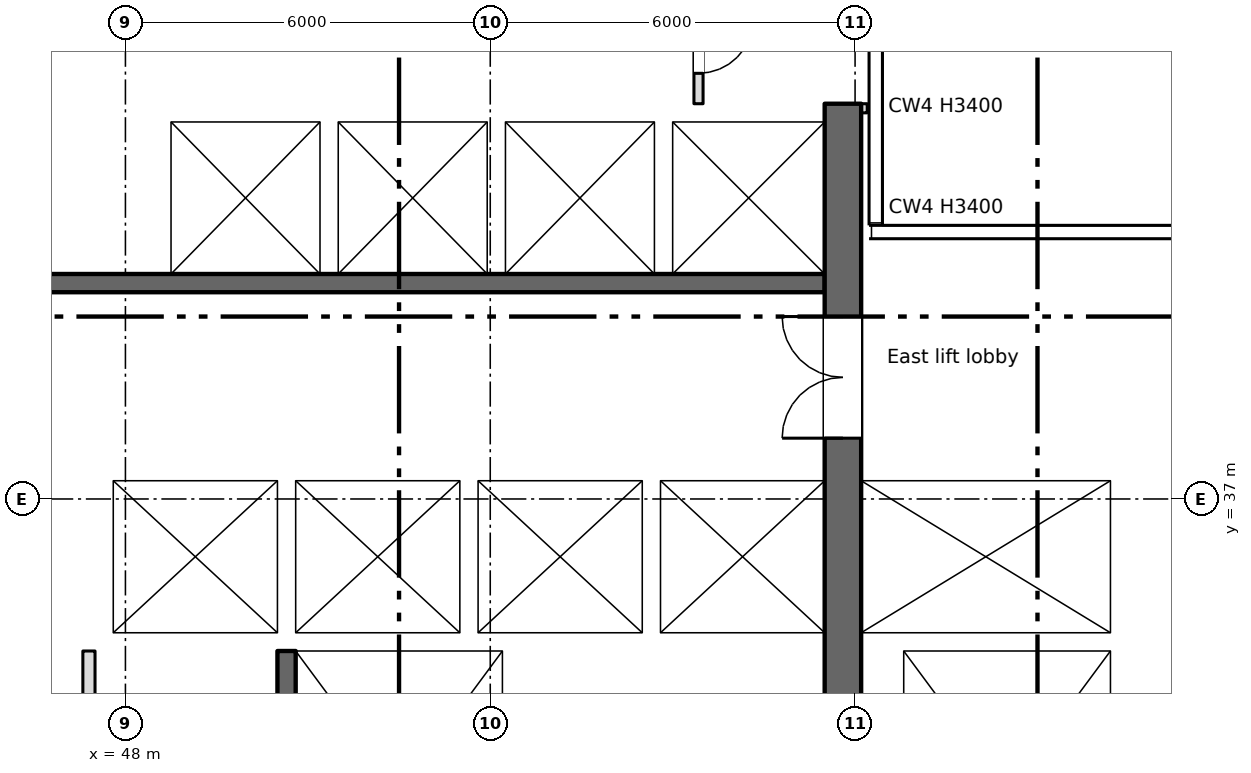
"""IFC4 building model, lengths in metres.
Left out: names, types, materials, properties, quantities, classifications, styles, units other than length and angle.
Written with IfcOpenShell. Run it as: python <this file> out.ifc"""

import sys

from ifc_helpers import new_model, si_unit, direction, frame, frame_2d, origin, place, context, subcontext, project, spatial, rectangle, extrude, element, fill, save


model = new_model("IFC4")
c1 = context("Model", 3, precision=1e-05, world=origin(), true_north=direction((0.0, 1.0)))
c2 = subcontext(c1, "Body", "Model", "MODEL_VIEW")
j1 = project(units=[si_unit("LENGTHUNIT", "METRE"), si_unit("PLANEANGLEUNIT", "RADIAN")], contexts=[c1])
p1 = place(None, origin())
s1 = spatial("IfcSite", under=j1, at=p1, CompositionType="ELEMENT")
p2 = place(p1, origin())
s2 = spatial("IfcBuilding", under=s1, at=p2, CompositionType="ELEMENT")
p3 = place(p2, frame((0.0, 0.0, 250.75)))
s3 = spatial("IfcBuildingStorey", under=s2, at=p3, CompositionType="ELEMENT", Elevation=250.75)
p4 = place(p3, frame((64.35, 34.8, 0.0), z_axis=(0.0, 0.0, 1.0), x_axis=(0.0, 1.0, 0.0)))
e1 = element("IfcWall", 1, at=p4, inside=s3, PredefinedType="SHEAR", context=c2, shape_type="SweptSolid", body=[
    extrude(rectangle(XDim=6.45, YDim=0.3, at=frame_2d((3.225, 0.0))), origin(), (0.0, 0.0, 1.0), 3.4),
])
p5 = place(p3, frame((59.8, 28.4, 0.0), z_axis=(0.0, 0.0, 1.0), x_axis=(0.0, 1.0, 0.0)))
e2 = element("IfcWall", 2, at=p5, inside=s3, PredefinedType="SHEAR", context=c2, shape_type="SweptSolid", body=[
    extrude(rectangle(XDim=15.1, YDim=0.6, at=frame_2d((7.55, 0.0))), origin(), (0.0, 0.0, 1.0), 3.4),
])
p6 = place(p5, frame((9.6, 0.0, 0.0)))
e3 = element("IfcOpeningElement", 3, at=p6, cuts=e2, PredefinedType="OPENING", context=c2, shape_type="SweptSolid", body=[
    extrude(rectangle(XDim=2.0, YDim=2.1, at=frame_2d((1.0, 1.05))), frame((0.0, 0.31, 0.0), z_axis=(0.0, -1.0, 0.0), x_axis=(1.0, 0.0, 0.0)), (0.0, 0.0, 1.0), 0.62),
])
p7 = place(p3, frame((50.65, 34.5, 0.0), z_axis=(0.0, 0.0, 1.0), x_axis=(0.0, -1.0, 0.0)))
e4 = element("IfcWall", 4, at=p7, inside=s3, PredefinedType="SHEAR", context=c2, shape_type="SweptSolid", body=[
    extrude(rectangle(XDim=6.1, YDim=0.3, at=frame_2d((3.05, 0.0))), origin(), (0.0, 0.0, 1.0), 3.4),
])
p8 = place(p7, frame((4.95, 0.0, 0.0)))
e5 = element("IfcOpeningElement", 5, at=p8, cuts=e4, PredefinedType="OPENING", context=c2, shape_type="SweptSolid", body=[
    extrude(rectangle(XDim=1.1, YDim=2.1, at=frame_2d((0.55, 1.05))), frame((0.0, 0.16, 0.0), z_axis=(0.0, -1.0, 0.0), x_axis=(1.0, 0.0, 0.0)), (0.0, 0.0, 1.0), 0.32),
])
p9 = place(p3, frame((54.35, 28.4, 0.0), z_axis=(0.0, 0.0, 1.0), x_axis=(0.0, 1.0, 0.0)))
e6 = element("IfcWall", 6, at=p9, inside=s3, PredefinedType="SHEAR", context=c2, shape_type="SweptSolid", body=[
    extrude(rectangle(XDim=6.1, YDim=0.3, at=frame_2d((3.05, 0.0))), origin(), (0.0, 0.0, 1.0), 3.4),
])
p10 = place(p3, frame((60.45, 28.4, 0.0), z_axis=(0.0, 0.0, 1.0), x_axis=(0.0, 1.0, 0.0)))
e7 = element("IfcWall", 7, at=p10, inside=s3, PredefinedType="SHEAR", context=c2, shape_type="SweptSolid", body=[
    extrude(rectangle(XDim=6.1, YDim=0.7, at=frame_2d((3.05, 0.0))), origin(), (0.0, 0.0, 1.0), 3.4),
])
p11 = place(p3, frame((64.35, 28.4, 0.0), z_axis=(0.0, 0.0, 1.0), x_axis=(0.0, 1.0, 0.0)))
e8 = element("IfcWall", 8, at=p11, inside=s3, PredefinedType="SHEAR", context=c2, shape_type="SweptSolid", body=[
    extrude(rectangle(XDim=6.1, YDim=0.3, at=frame_2d((3.05, 0.0))), origin(), (0.0, 0.0, 1.0), 3.4),
])
p12 = place(p3, frame((47.3, 34.65, 0.0), z_axis=(0.0, 0.0, 1.0), x_axis=(1.0, 0.0, 0.0)))
e9 = element("IfcWall", 9, at=p12, inside=s3, PredefinedType="SHEAR", context=c2, shape_type="SweptSolid", body=[
    extrude(rectangle(XDim=12.2, YDim=0.3, at=frame_2d((6.1, 0.0))), origin(), (0.0, 0.0, 1.0), 3.4),
])
p13 = place(p12, frame((1.3, 0.0, 0.0)))
e10 = element("IfcOpeningElement", 10, at=p13, cuts=e9, PredefinedType="OPENING", context=c2, shape_type="SweptSolid", body=[
    extrude(rectangle(XDim=1.1, YDim=2.1, at=frame_2d((0.55, 1.05))), frame((0.0, 0.16, 0.0), z_axis=(0.0, -1.0, 0.0), x_axis=(1.0, 0.0, 0.0)), (0.0, 0.0, 1.0), 0.32),
])
p14 = place(p3, frame((60.1, 34.65, 0.0), z_axis=(0.0, 0.0, 1.0), x_axis=(1.0, 0.0, 0.0)))
e11 = element("IfcWall", 11, at=p14, inside=s3, PredefinedType="SHEAR", context=c2, shape_type="SweptSolid", body=[
    extrude(rectangle(XDim=4.4, YDim=0.3, at=frame_2d((2.2, 0.0))), origin(), (0.0, 0.0, 1.0), 3.4),
])
p15 = place(p3, frame((47.3, 37.45, 0.0), z_axis=(0.0, 0.0, 1.0), x_axis=(1.0, 0.0, 0.0)))
e12 = element("IfcWall", 12, at=p15, inside=s3, PredefinedType="SHEAR", context=c2, shape_type="SweptSolid", body=[
    extrude(rectangle(XDim=12.2, YDim=0.3, at=frame_2d((6.1, 0.0))), origin(), (0.0, 0.0, 1.0), 3.4),
])
p16 = place(p15, frame((4.3, 0.0, 0.0)))
e13 = element("IfcOpeningElement", 13, at=p16, cuts=e12, PredefinedType="OPENING", context=c2, shape_type="SweptSolid", body=[
    extrude(rectangle(XDim=1.1, YDim=2.1, at=frame_2d((0.55, 1.05))), frame((0.0, 0.16, 0.0), z_axis=(0.0, -1.0, 0.0), x_axis=(1.0, 0.0, 0.0)), (0.0, 0.0, 1.0), 0.32),
])
p17 = place(p15, frame((7.3, 0.0, 0.0)))
e14 = element("IfcOpeningElement", 14, at=p17, cuts=e12, PredefinedType="OPENING", context=c2, shape_type="SweptSolid", body=[
    extrude(rectangle(XDim=1.1, YDim=2.1, at=frame_2d((0.55, 1.05))), frame((0.0, 0.16, 0.0), z_axis=(0.0, -1.0, 0.0), x_axis=(1.0, 0.0, 0.0)), (0.0, 0.0, 1.0), 0.32),
])
p18 = place(p15, frame((10.3, 0.0, 0.0)))
e15 = element("IfcOpeningElement", 15, at=p18, cuts=e12, PredefinedType="OPENING", context=c2, shape_type="SweptSolid", body=[
    extrude(rectangle(XDim=1.1, YDim=2.1, at=frame_2d((0.55, 1.05))), frame((0.0, 0.16, 0.0), z_axis=(0.0, -1.0, 0.0), x_axis=(1.0, 0.0, 0.0)), (0.0, 0.0, 1.0), 0.32),
])
p19 = place(p3, frame((60.1, 37.45, 0.0), z_axis=(0.0, 0.0, 1.0), x_axis=(1.0, 0.0, 0.0)))
e16 = element("IfcWall", 16, at=p19, inside=s3, PredefinedType="SHEAR", context=c2, shape_type="SweptSolid", body=[
    extrude(rectangle(XDim=4.1, YDim=0.3, at=frame_2d((2.05, 0.0))), origin(), (0.0, 0.0, 1.0), 3.4),
])
p20 = place(p19, frame((1.5, 0.0, 0.0)))
e17 = element("IfcOpeningElement", 17, at=p20, cuts=e16, PredefinedType="OPENING", context=c2, shape_type="SweptSolid", body=[
    extrude(rectangle(XDim=1.1, YDim=2.1, at=frame_2d((0.55, 1.05))), frame((0.0, 0.16, 0.0), z_axis=(0.0, -1.0, 0.0), x_axis=(1.0, 0.0, 0.0)), (0.0, 0.0, 1.0), 0.32),
])
p21 = place(p3, frame((47.55, 34.8, 0.0), z_axis=(0.0, 0.0, 1.0), x_axis=(0.0, 1.0, 0.0)))
e18 = element("IfcWall", 18, at=p21, inside=s3, PredefinedType="SHEAR", context=c2, shape_type="SweptSolid", body=[
    extrude(rectangle(XDim=2.5, YDim=0.5, at=frame_2d((1.25, 0.0))), origin(), (0.0, 0.0, 1.0), 3.4),
])
p22 = place(p3, frame((50.65, 34.8, 0.0), z_axis=(0.0, 0.0, 1.0), x_axis=(0.0, 1.0, 0.0)))
e19 = element("IfcWall", 19, at=p22, inside=s3, PredefinedType="SHEAR", context=c2, shape_type="SweptSolid", body=[
    extrude(rectangle(XDim=2.5, YDim=0.3, at=frame_2d((1.25, 0.0))), origin(), (0.0, 0.0, 1.0), 3.4),
])
p23 = place(p3, frame((18.5, 40.55, 0.0), z_axis=(0.0, 0.0, 1.0), x_axis=(1.0, 0.0, 0.0)))
e20 = element("IfcWall", 20, at=p23, inside=s3, PredefinedType="SHEAR", context=c2, shape_type="SweptSolid", body=[
    extrude(rectangle(XDim=41.0, YDim=0.3, at=frame_2d((20.5, 0.0))), origin(), (0.0, 0.0, 1.0), 3.4),
])
p24 = place(p23, frame((2.15, 0.0, 0.0)))
e21 = element("IfcOpeningElement", 21, at=p24, cuts=e20, PredefinedType="OPENING", context=c2, shape_type="SweptSolid", body=[
    extrude(rectangle(XDim=0.9, YDim=2.1, at=frame_2d((0.45, 1.05))), frame((0.0, 0.16, 0.0), z_axis=(0.0, -1.0, 0.0), x_axis=(1.0, 0.0, 0.0)), (0.0, 0.0, 1.0), 0.32),
])
p25 = place(p23, frame((15.9, 0.0, 0.0)))
e22 = element("IfcOpeningElement", 22, at=p25, cuts=e20, PredefinedType="OPENING", context=c2, shape_type="SweptSolid", body=[
    extrude(rectangle(XDim=0.9, YDim=2.1, at=frame_2d((0.45, 1.05))), frame((0.0, 0.16, 0.0), z_axis=(0.0, -1.0, 0.0), x_axis=(1.0, 0.0, 0.0)), (0.0, 0.0, 1.0), 0.32),
])
p26 = place(p23, frame((21.4, 0.0, 0.0)))
e23 = element("IfcOpeningElement", 23, at=p26, cuts=e20, PredefinedType="OPENING", context=c2, shape_type="SweptSolid", body=[
    extrude(rectangle(XDim=0.9, YDim=2.1, at=frame_2d((0.45, 1.05))), frame((0.0, 0.16, 0.0), z_axis=(0.0, -1.0, 0.0), x_axis=(1.0, 0.0, 0.0)), (0.0, 0.0, 1.0), 0.32),
])
p27 = place(p23, frame((26.9, 0.0, 0.0)))
e24 = element("IfcOpeningElement", 24, at=p27, cuts=e20, PredefinedType="OPENING", context=c2, shape_type="SweptSolid", body=[
    extrude(rectangle(XDim=0.9, YDim=2.1, at=frame_2d((0.45, 1.05))), frame((0.0, 0.16, 0.0), z_axis=(0.0, -1.0, 0.0), x_axis=(1.0, 0.0, 0.0)), (0.0, 0.0, 1.0), 0.32),
])
p28 = place(p23, frame((6.175, 0.0, 0.0)))
e25 = element("IfcOpeningElement", 25, at=p28, cuts=e20, PredefinedType="OPENING", context=c2, shape_type="SweptSolid", body=[
    extrude(rectangle(XDim=1.1, YDim=2.1, at=frame_2d((0.55, 1.05))), frame((0.0, 0.16, 0.0), z_axis=(0.0, -1.0, 0.0), x_axis=(1.0, 0.0, 0.0)), (0.0, 0.0, 1.0), 0.32),
])
p29 = place(p23, frame((8.925, 0.0, 0.0)))
e26 = element("IfcOpeningElement", 26, at=p29, cuts=e20, PredefinedType="OPENING", context=c2, shape_type="SweptSolid", body=[
    extrude(rectangle(XDim=1.1, YDim=2.1, at=frame_2d((0.55, 1.05))), frame((0.0, 0.16, 0.0), z_axis=(0.0, -1.0, 0.0), x_axis=(1.0, 0.0, 0.0)), (0.0, 0.0, 1.0), 0.32),
])
p30 = place(p23, frame((11.675, 0.0, 0.0)))
e27 = element("IfcOpeningElement", 27, at=p30, cuts=e20, PredefinedType="OPENING", context=c2, shape_type="SweptSolid", body=[
    extrude(rectangle(XDim=1.1, YDim=2.1, at=frame_2d((0.55, 1.05))), frame((0.0, 0.16, 0.0), z_axis=(0.0, -1.0, 0.0), x_axis=(1.0, 0.0, 0.0)), (0.0, 0.0, 1.0), 0.32),
])
p31 = place(p23, frame((30.925, 0.0, 0.0)))
e28 = element("IfcOpeningElement", 28, at=p31, cuts=e20, PredefinedType="OPENING", context=c2, shape_type="SweptSolid", body=[
    extrude(rectangle(XDim=1.1, YDim=2.1, at=frame_2d((0.55, 1.05))), frame((0.0, 0.16, 0.0), z_axis=(0.0, -1.0, 0.0), x_axis=(1.0, 0.0, 0.0)), (0.0, 0.0, 1.0), 0.32),
])
p32 = place(p23, frame((33.675, 0.0, 0.0)))
e29 = element("IfcOpeningElement", 29, at=p32, cuts=e20, PredefinedType="OPENING", context=c2, shape_type="SweptSolid", body=[
    extrude(rectangle(XDim=1.1, YDim=2.1, at=frame_2d((0.55, 1.05))), frame((0.0, 0.16, 0.0), z_axis=(0.0, -1.0, 0.0), x_axis=(1.0, 0.0, 0.0)), (0.0, 0.0, 1.0), 0.32),
])
p33 = place(p23, frame((36.375, 0.0, 0.0)))
e30 = element("IfcOpeningElement", 30, at=p33, cuts=e20, PredefinedType="OPENING", context=c2, shape_type="SweptSolid", body=[
    extrude(rectangle(XDim=1.2, YDim=2.1, at=frame_2d((0.6, 1.05))), frame((0.0, 0.16, 0.0), z_axis=(0.0, -1.0, 0.0), x_axis=(1.0, 0.0, 0.0)), (0.0, 0.0, 1.0), 0.32),
])
p34 = place(p23, frame((39.15, 0.0, 0.0)))
e31 = element("IfcOpeningElement", 31, at=p34, cuts=e20, PredefinedType="OPENING", context=c2, shape_type="SweptSolid", body=[
    extrude(rectangle(XDim=1.2, YDim=2.1, at=frame_2d((0.6, 1.05))), frame((0.0, 0.16, 0.0), z_axis=(0.0, -1.0, 0.0), x_axis=(1.0, 0.0, 0.0)), (0.0, 0.0, 1.0), 0.32),
])
p35 = place(p3, frame((18.5, 43.35, 0.0), z_axis=(0.0, 0.0, 1.0), x_axis=(1.0, 0.0, 0.0)))
e32 = element("IfcWall", 32, at=p35, inside=s3, PredefinedType="SHEAR", context=c2, shape_type="SweptSolid", body=[
    extrude(rectangle(XDim=41.0, YDim=0.3, at=frame_2d((20.5, 0.0))), origin(), (0.0, 0.0, 1.0), 3.4),
])
for number, where, z_axis, x_axis in (
    (33, (53.65, 34.8, 0.0), (0.0, 0.0, 1.0), (0.0, 1.0, 0.0)),
    (34, (56.65, 34.8, 0.0), (0.0, 0.0, 1.0), (0.0, 1.0, 0.0)),
    (35, (48.6, 40.7, 0.0), (0.0, 0.0, 1.0), (0.0, 1.0, 0.0)),
    (36, (51.35, 40.7, 0.0), (0.0, 0.0, 1.0), (0.0, 1.0, 0.0)),
    (37, (54.1, 40.7, 0.0), (0.0, 0.0, 1.0), (0.0, 1.0, 0.0)),
    (38, (56.85, 40.7, 0.0), (0.0, 0.0, 1.0), (0.0, 1.0, 0.0)),
):
    element("IfcWall", number, at=place(p3, frame(where, z_axis=z_axis, x_axis=x_axis)), inside=s3, PredefinedType="SHEAR", context=c2, shape_type="SweptSolid", body=[
        extrude(rectangle(XDim=2.5, YDim=0.3, at=frame_2d((1.25, 0.0))), origin(), (0.0, 0.0, 1.0), 3.4),
    ])
p36 = place(p3, frame((47.4, 28.4, 0.0), z_axis=(0.0, 0.0, 1.0), x_axis=(0.0, 1.0, 0.0)))
e39 = element("IfcWall", 39, at=p36, inside=s3, PredefinedType="PARTITIONING", context=c2, shape_type="SweptSolid", body=[
    extrude(rectangle(XDim=6.1, YDim=0.2, at=frame_2d((3.05, 0.0))), origin(), (0.0, 0.0, 1.0), 3.4),
])
p37 = place(p3, frame((57.425, 45.4, 0.0), z_axis=(0.0, 0.0, 1.0), x_axis=(0.0, -1.0, 0.0)))
e40 = element("IfcWall", 40, at=p37, inside=s3, PredefinedType="PARTITIONING", context=c2, shape_type="SweptSolid", body=[
    extrude(rectangle(XDim=1.9, YDim=0.15, at=frame_2d((0.95, 0.0))), origin(), (0.0, 0.0, 1.0), 3.4),
])
p38 = place(p37, frame((0.5, 0.0, 0.0)))
e41 = element("IfcOpeningElement", 41, at=p38, cuts=e40, PredefinedType="OPENING", context=c2, shape_type="SweptSolid", body=[
    extrude(rectangle(XDim=0.9, YDim=2.1, at=frame_2d((0.45, 1.05))), frame((0.0, 0.085, 0.0), z_axis=(0.0, -1.0, 0.0), x_axis=(1.0, 0.0, 0.0)), (0.0, 0.0, 1.0), 0.17),
])
p39 = place(p3, frame((60.15, 43.35, 0.0), z_axis=(0.0, 0.0, 1.0), x_axis=(0.0, 1.0, 0.0)))
e42 = element("IfcWall", 42, at=p39, inside=s3, PredefinedType="PARTITIONING", context=c2, shape_type="SweptSolid", body=[
    extrude(rectangle(XDim=0.15, YDim=0.1, at=frame_2d((0.075, 0.0))), origin(), (0.0, 0.0, 1.0), 3.4),
])
p40 = place(p38, origin())
e43 = element("IfcDoor", 43, at=p40, inside=s3, OperationType="SINGLE_SWING_LEFT", PredefinedType="DOOR", context=c2, shape_type="SweptSolid", body=[
    extrude(rectangle(XDim=0.9, YDim=2.1, at=frame_2d((0.45, 1.05))), frame((0.0, 0.025, 0.0), z_axis=(0.0, -1.0, 0.0), x_axis=(1.0, 0.0, 0.0)), (0.0, 0.0, 1.0), 0.05),
])
fill(e41, e43)
p41 = place(p16, origin())
e44 = element("IfcDoor", 44, at=p41, inside=s3, OperationType="SLIDING_TO_LEFT", PredefinedType="DOOR", context=c2, shape_type="SweptSolid", body=[
    extrude(rectangle(XDim=1.1, YDim=2.1, at=frame_2d((0.55, 1.05))), frame((0.0, 0.025, 0.0), z_axis=(0.0, -1.0, 0.0), x_axis=(1.0, 0.0, 0.0)), (0.0, 0.0, 1.0), 0.05),
])
fill(e13, e44)
p42 = place(p17, origin())
e45 = element("IfcDoor", 45, at=p42, inside=s3, OperationType="SLIDING_TO_LEFT", PredefinedType="DOOR", context=c2, shape_type="SweptSolid", body=[
    extrude(rectangle(XDim=1.1, YDim=2.1, at=frame_2d((0.55, 1.05))), frame((0.0, 0.025, 0.0), z_axis=(0.0, -1.0, 0.0), x_axis=(1.0, 0.0, 0.0)), (0.0, 0.0, 1.0), 0.05),
])
fill(e14, e45)
p43 = place(p18, origin())
e46 = element("IfcDoor", 46, at=p43, inside=s3, OperationType="SLIDING_TO_LEFT", PredefinedType="DOOR", context=c2, shape_type="SweptSolid", body=[
    extrude(rectangle(XDim=1.1, YDim=2.1, at=frame_2d((0.55, 1.05))), frame((0.0, 0.025, 0.0), z_axis=(0.0, -1.0, 0.0), x_axis=(1.0, 0.0, 0.0)), (0.0, 0.0, 1.0), 0.05),
])
fill(e15, e46)
p44 = place(p31, origin())
e47 = element("IfcDoor", 47, at=p44, inside=s3, OperationType="SLIDING_TO_LEFT", PredefinedType="DOOR", context=c2, shape_type="SweptSolid", body=[
    extrude(rectangle(XDim=1.1, YDim=2.1, at=frame_2d((0.55, 1.05))), frame((0.0, 0.025, 0.0), z_axis=(0.0, -1.0, 0.0), x_axis=(1.0, 0.0, 0.0)), (0.0, 0.0, 1.0), 0.05),
])
fill(e28, e47)
p45 = place(p32, origin())
e48 = element("IfcDoor", 48, at=p45, inside=s3, OperationType="SLIDING_TO_LEFT", PredefinedType="DOOR", context=c2, shape_type="SweptSolid", body=[
    extrude(rectangle(XDim=1.1, YDim=2.1, at=frame_2d((0.55, 1.05))), frame((0.0, 0.025, 0.0), z_axis=(0.0, -1.0, 0.0), x_axis=(1.0, 0.0, 0.0)), (0.0, 0.0, 1.0), 0.05),
])
fill(e29, e48)
p46 = place(p33, origin())
e49 = element("IfcDoor", 49, at=p46, inside=s3, OperationType="SLIDING_TO_LEFT", PredefinedType="DOOR", context=c2, shape_type="SweptSolid", body=[
    extrude(rectangle(XDim=1.2, YDim=2.1, at=frame_2d((0.6, 1.05))), frame((0.0, 0.025, 0.0), z_axis=(0.0, -1.0, 0.0), x_axis=(1.0, 0.0, 0.0)), (0.0, 0.0, 1.0), 0.05),
])
fill(e30, e49)
p47 = place(p34, origin())
e50 = element("IfcDoor", 50, at=p47, inside=s3, OperationType="SLIDING_TO_LEFT", PredefinedType="DOOR", context=c2, shape_type="SweptSolid", body=[
    extrude(rectangle(XDim=1.2, YDim=2.1, at=frame_2d((0.6, 1.05))), frame((0.0, 0.025, 0.0), z_axis=(0.0, -1.0, 0.0), x_axis=(1.0, 0.0, 0.0)), (0.0, 0.0, 1.0), 0.05),
])
fill(e31, e50)
p48 = place(p20, origin())
e51 = element("IfcDoor", 51, at=p48, inside=s3, OperationType="SLIDING_TO_LEFT", PredefinedType="DOOR", context=c2, shape_type="SweptSolid", body=[
    extrude(rectangle(XDim=1.1, YDim=2.1, at=frame_2d((0.55, 1.05))), frame((0.0, 0.025, 0.0), z_axis=(0.0, -1.0, 0.0), x_axis=(1.0, 0.0, 0.0)), (0.0, 0.0, 1.0), 0.05),
])
fill(e17, e51)
p49 = place(p13, origin())
e52 = element("IfcDoor", 52, at=p49, inside=s3, OperationType="SLIDING_TO_LEFT", PredefinedType="DOOR", context=c2, shape_type="SweptSolid", body=[
    extrude(rectangle(XDim=1.1, YDim=2.1, at=frame_2d((0.55, 1.05))), frame((0.0, 0.025, 0.0), z_axis=(0.0, -1.0, 0.0), x_axis=(1.0, 0.0, 0.0)), (0.0, 0.0, 1.0), 0.05),
])
fill(e10, e52)
p50 = place(p6, origin())
e53 = element("IfcDoor", 53, at=p50, inside=s3, OperationType="DOUBLE_DOOR_SINGLE_SWING", PredefinedType="DOOR", context=c2, shape_type="SweptSolid", body=[
    extrude(rectangle(XDim=2.0, YDim=2.1, at=frame_2d((1.0, 1.05))), frame((0.0, 0.025, 0.0), z_axis=(0.0, -1.0, 0.0), x_axis=(1.0, 0.0, 0.0)), (0.0, 0.0, 1.0), 0.05),
])
fill(e3, e53)
save(model, sys.argv[1])
